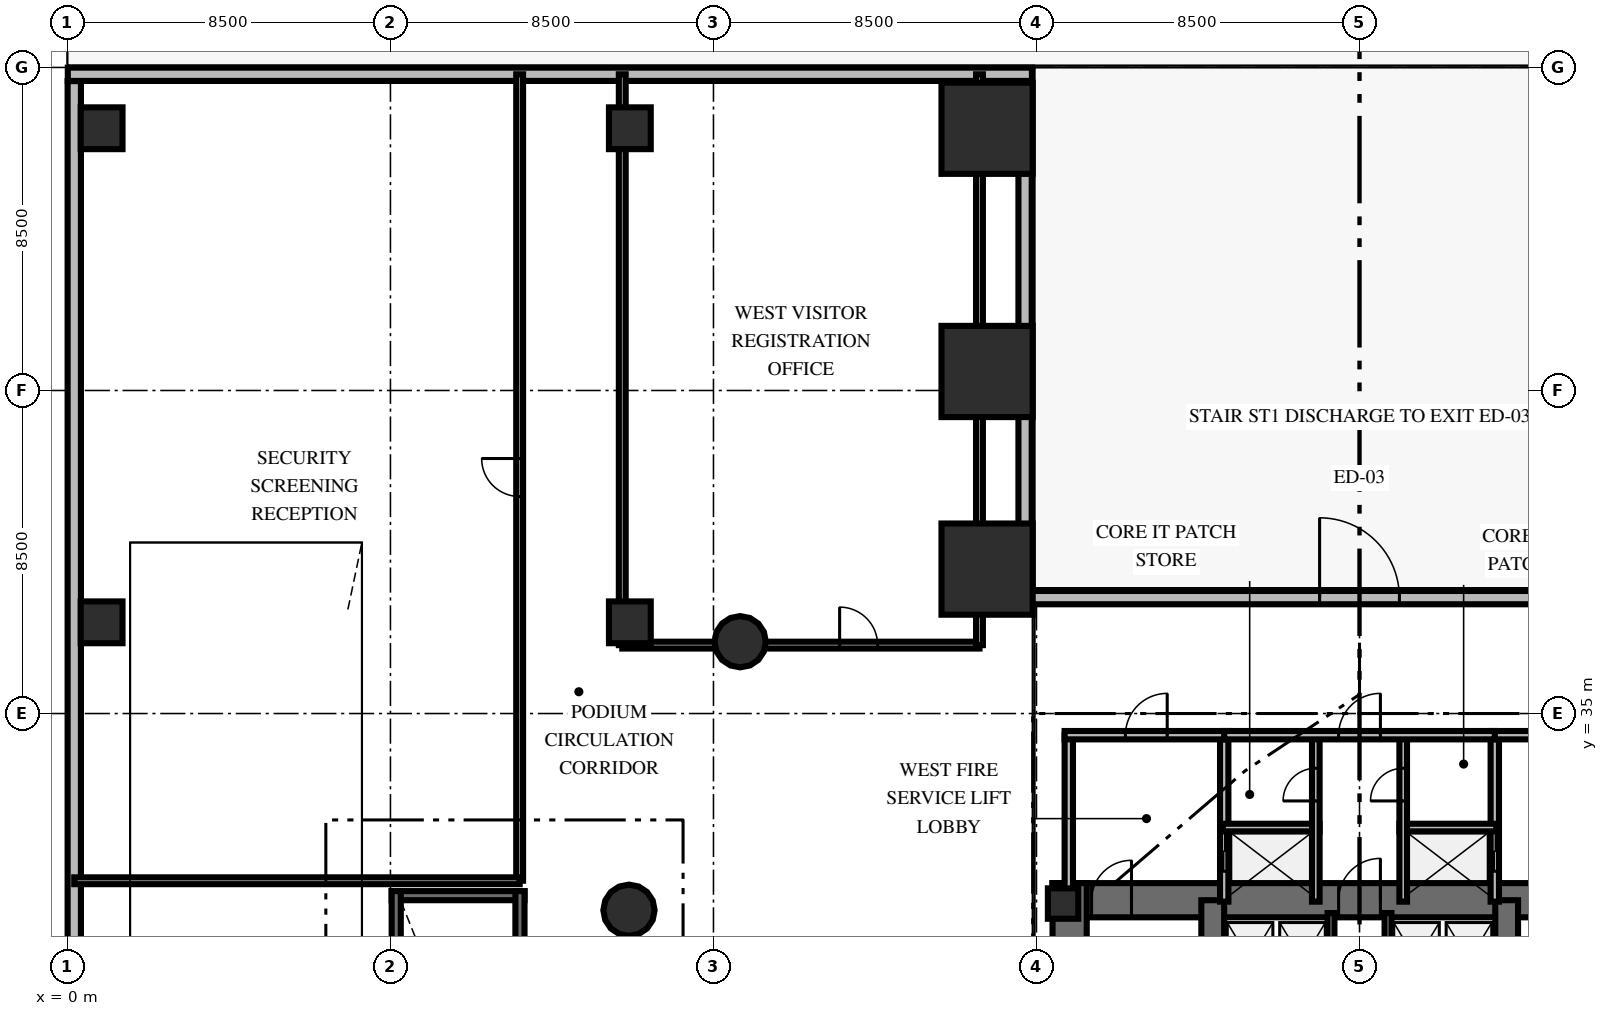
"""IFC4 building model, lengths in metres.
Left out: names, types, materials, properties, quantities, classifications, styles, units other than length and angle.
Written with IfcOpenShell. Run it as: python <this file> out.ifc"""

import sys

from ifc_helpers import new_model, si_unit, direction, frame, frame_2d, origin, origin_2d, place, context, subcontext, project, spatial, rectangle, circle, extrude, element, fill, save


model = new_model("IFC4")
c1 = context("Model", 3, precision=1e-05, world=origin(), true_north=direction((0.0, 1.0)))
c2 = subcontext(c1, "Body", "Model", "MODEL_VIEW")
j1 = project(units=[si_unit("LENGTHUNIT", "METRE"), si_unit("PLANEANGLEUNIT", "RADIAN")], contexts=[c1])
p1 = place(None, origin())
s1 = spatial("IfcSite", under=j1, at=p1, CompositionType="ELEMENT")
p2 = place(p1, origin())
s2 = spatial("IfcBuilding", under=s1, at=p2, CompositionType="ELEMENT")
p3 = place(p2, origin())
s3 = spatial("IfcBuildingStorey", under=s2, at=p3, CompositionType="ELEMENT", Elevation=0.0)
p4 = place(p3, frame((25.922, 30.088, 0.0), z_axis=(0.0, 0.0, 1.0), x_axis=(1.0, 0.0, 0.0)))
e1 = element("IfcWall", 1, at=p4, inside=s3, PredefinedType="SHEAR", context=c2, shape_type="SweptSolid", body=[
    extrude(rectangle(XDim=16.166, YDim=0.9, at=frame_2d((8.083, 0.0))), origin(), (0.0, 0.0, 1.0), 5.4),
])
p5 = place(p4, frame((1.028, 0.0, 0.0)))
e2 = element("IfcOpeningElement", 2, at=p5, cuts=e1, PredefinedType="OPENING", context=c2, shape_type="SweptSolid", body=[
    extrude(rectangle(XDim=1.05, YDim=2.15, at=frame_2d((0.525, 1.075))), frame((0.0, 0.46, 0.0), z_axis=(0.0, -1.0, 0.0), x_axis=(1.0, 0.0, 0.0)), (0.0, 0.0, 1.0), 0.92),
])
p6 = place(p4, frame((14.078, 0.0, 0.0)))
e3 = element("IfcOpeningElement", 3, at=p6, cuts=e1, PredefinedType="OPENING", context=c2, shape_type="SweptSolid", body=[
    extrude(rectangle(XDim=1.05, YDim=2.15, at=frame_2d((0.525, 1.075))), frame((0.0, 0.46, 0.0), z_axis=(0.0, -1.0, 0.0), x_axis=(1.0, 0.0, 0.0)), (0.0, 0.0, 1.0), 0.92),
])
p7 = place(p4, frame((7.528, 0.0, 0.0)))
e4 = element("IfcOpeningElement", 4, at=p7, cuts=e1, PredefinedType="OPENING", context=c2, shape_type="SweptSolid", body=[
    extrude(rectangle(XDim=1.1, YDim=2.15, at=frame_2d((0.55, 1.075))), frame((0.0, 0.46, 0.0), z_axis=(0.0, -1.0, 0.0), x_axis=(1.0, 0.0, 0.0)), (0.0, 0.0, 1.0), 0.92),
])
p8 = place(p3, frame((26.372, 19.662, 0.0), z_axis=(0.0, 0.0, 1.0), x_axis=(0.0, 1.0, 0.0)))
e5 = element("IfcWall", 5, at=p8, inside=s3, PredefinedType="SHEAR", context=c2, shape_type="SweptSolid", body=[
    extrude(rectangle(XDim=10.876, YDim=0.9, at=frame_2d((5.438, 0.0))), origin(), (0.0, 0.0, 1.0), 5.4),
])
for number, where, z_axis, x_axis in (
    (6, (30.138, 20.112, 0.0), (0.0, 0.0, 1.0), (0.0, 1.0, 0.0)),
    (7, (37.872, 20.112, 0.0), (0.0, 0.0, 1.0), (0.0, 1.0, 0.0)),
):
    element("IfcWall", number, at=place(p3, frame(where, z_axis=z_axis, x_axis=x_axis)), inside=s3, PredefinedType="SHEAR", context=c2, shape_type="SweptSolid", body=[
        extrude(rectangle(XDim=9.976, YDim=0.6, at=frame_2d((4.988, 0.0))), origin(), (0.0, 0.0, 1.0), 5.4),
    ])
p9 = place(p3, frame((26.2, 30.0, 0.0), z_axis=(0.0, 0.0, 1.0), x_axis=(1.0, 0.0, 0.0)))
e8 = element("IfcColumn", 8, at=p9, inside=s3, PredefinedType="PILASTER", context=c2, shape_type="SweptSolid", body=[
    extrude(rectangle(XDim=0.8, YDim=0.8, at=origin_2d()), origin(), (0.0, 0.0, 1.0), 5.4),
])
p10 = place(p3, frame((8.532, 30.208, 0.0), z_axis=(0.0, 0.0, 1.0), x_axis=(1.0, 0.0, 0.0)))
e9 = element("IfcWall", 9, at=p10, inside=s3, PredefinedType="SHEAR", context=c2, shape_type="SweptSolid", body=[
    extrude(rectangle(XDim=3.496, YDim=0.24, at=frame_2d((1.748, 0.0))), origin(), (0.0, 0.0, 1.0), 5.4),
])
p11 = place(p3, frame((8.652, 20.772, 0.0), z_axis=(0.0, 0.0, 1.0), x_axis=(0.0, 1.0, 0.0)))
e10 = element("IfcWall", 10, at=p11, inside=s3, PredefinedType="SHEAR", context=c2, shape_type="SweptSolid", body=[
    extrude(rectangle(XDim=9.556, YDim=0.24, at=frame_2d((4.778, 0.0))), origin(), (0.0, 0.0, 1.0), 5.4),
])
p12 = place(p3, frame((11.908, 20.772, 0.0), z_axis=(0.0, 0.0, 1.0), x_axis=(0.0, 1.0, 0.0)))
e11 = element("IfcWall", 11, at=p12, inside=s3, PredefinedType="SHEAR", context=c2, shape_type="SweptSolid", body=[
    extrude(rectangle(XDim=9.556, YDim=0.24, at=frame_2d((4.778, 0.0))), origin(), (0.0, 0.0, 1.0), 5.4),
])
p13 = place(p12, frame((0.55, 0.0, 0.0)))
e12 = element("IfcOpeningElement", 12, at=p13, cuts=e11, PredefinedType="OPENING", context=c2, shape_type="SweptSolid", body=[
    extrude(rectangle(XDim=1.05, YDim=2.15, at=frame_2d((0.525, 1.075))), frame((0.0, 0.13, 0.0), z_axis=(0.0, -1.0, 0.0), x_axis=(1.0, 0.0, 0.0)), (0.0, 0.0, 1.0), 0.26),
])
for number, where, z_axis, x_axis in (
    (13, (24.2, 38.8, 0.0), (0.0, 0.0, 1.0), (1.0, 0.0, 0.0)),
    (14, (24.2, 44.0, 0.0), (0.0, 0.0, 1.0), (1.0, 0.0, 0.0)),
    (15, (24.2, 50.4, 0.0), (0.0, 0.0, 1.0), (1.0, 0.0, 0.0)),
):
    element("IfcColumn", number, at=place(p3, frame(where, z_axis=z_axis, x_axis=x_axis)), inside=s3, PredefinedType="USERDEFINED", context=c2, shape_type="SweptSolid", body=[
        extrude(rectangle(XDim=2.4, YDim=2.4, at=origin_2d()), origin(), (0.0, 0.0, 1.0), 5.4),
    ])
for number, where, z_axis, x_axis in (
    (16, (0.9, 37.4, 0.0), (0.0, 0.0, 1.0), (1.0, 0.0, 0.0)),
    (17, (0.9, 50.4, 0.0), (0.0, 0.0, 1.0), (1.0, 0.0, 0.0)),
    (18, (14.8, 37.4, 0.0), (0.0, 0.0, 1.0), (1.0, 0.0, 0.0)),
    (19, (14.8, 50.4, 0.0), (0.0, 0.0, 1.0), (1.0, 0.0, 0.0)),
):
    element("IfcColumn", number, at=place(p3, frame(where, z_axis=z_axis, x_axis=x_axis)), inside=s3, PredefinedType="COLUMN", context=c2, shape_type="SweptSolid", body=[
        extrude(rectangle(XDim=1.1, YDim=1.1, at=origin_2d()), origin(), (0.0, 0.0, 1.0), 5.4),
    ])
for number, where, z_axis, x_axis in (
    (20, (17.703, 36.889, 0.0), (0.0, 0.0, 1.0), (1.0, 0.0, 0.0)),
    (21, (14.777, 29.824, 0.0), (0.0, 0.0, 1.0), (1.0, 0.0, 0.0)),
):
    element("IfcColumn", number, at=place(p3, frame(where, z_axis=z_axis, x_axis=x_axis)), inside=s3, PredefinedType="COLUMN", context=c2, shape_type="SweptSolid", body=[
        extrude(circle(Radius=0.675, at=origin_2d()), origin(), (0.0, 0.0, 1.0), 5.4),
    ])
p14 = place(p3, frame((0.18, 0.36, 0.0), z_axis=(0.0, 0.0, 1.0), x_axis=(0.0, 1.0, 0.0)))
e22 = element("IfcWall", 22, at=p14, inside=s3, PredefinedType="SOLIDWALL", context=c2, shape_type="SweptSolid", body=[
    extrude(rectangle(XDim=51.28, YDim=0.35, at=frame_2d((25.64, 0.0))), origin(), (0.0, 0.0, 1.0), 4.36),
])
p15 = place(p14, frame((3.5, 0.0, 0.0)))
e23 = element("IfcOpeningElement", 23, at=p15, cuts=e22, PredefinedType="OPENING", context=c2, shape_type="SweptSolid", body=[
    extrude(rectangle(XDim=4.8, YDim=3.1, at=frame_2d((2.4, 1.55))), frame((0.0, 0.185, 0.0), z_axis=(0.0, -1.0, 0.0), x_axis=(1.0, 0.0, 0.0)), (0.0, 0.0, 1.0), 0.37),
])
p16 = place(p3, frame((0.01, 51.82, 0.0), z_axis=(0.0, 0.0, 1.0), x_axis=(1.0, 0.0, 0.0)))
e24 = element("IfcWall", 24, at=p16, inside=s3, PredefinedType="SOLIDWALL", context=c2, shape_type="SweptSolid", body=[
    extrude(rectangle(XDim=25.37, YDim=0.35, at=frame_2d((12.685, 0.0))), origin(), (0.0, 0.0, 1.0), 4.36),
])
p17 = place(p3, frame((25.2, 51.64, 0.0), z_axis=(0.0, 0.0, 1.0), x_axis=(0.0, -1.0, 0.0)))
e25 = element("IfcWall", 25, at=p17, inside=s3, PredefinedType="SOLIDWALL", context=c2, shape_type="SweptSolid", body=[
    extrude(rectangle(XDim=13.59, YDim=0.35, at=frame_2d((6.795, 0.0))), origin(), (0.0, 0.0, 1.0), 4.36),
])
p18 = place(p3, frame((25.38, 38.05, 0.0), z_axis=(0.0, 0.0, 1.0), x_axis=(1.0, 0.0, 0.0)))
e26 = element("IfcWall", 26, at=p18, inside=s3, PredefinedType="SOLIDWALL", context=c2, shape_type="SweptSolid", body=[
    extrude(rectangle(XDim=17.24, YDim=0.35, at=frame_2d((8.62, 0.0))), origin(), (0.0, 0.0, 1.0), 4.36),
])
p19 = place(p18, frame((7.57, 0.0, 0.0)))
e27 = element("IfcOpeningElement", 27, at=p19, cuts=e26, PredefinedType="OPENING", context=c2, shape_type="SweptSolid", body=[
    extrude(rectangle(XDim=2.1, YDim=2.35, at=frame_2d((1.05, 1.175))), frame((0.0, 0.185, 0.0), z_axis=(0.0, -1.0, 0.0), x_axis=(1.0, 0.0, 0.0)), (0.0, 0.0, 1.0), 0.37),
])
p20 = place(p3, frame((26.35, 30.05, 0.0), z_axis=(0.0, 0.0, 1.0), x_axis=(0.0, 1.0, 0.0)))
e28 = element("IfcWall", 28, at=p20, inside=s3, PredefinedType="SOLIDWALL", context=c2, shape_type="SweptSolid", body=[
    extrude(rectangle(XDim=4.38, YDim=0.22, at=frame_2d((2.19, 0.0))), origin(), (0.0, 0.0, 1.0), 4.16),
])
p21 = place(p3, frame((30.44, 30.05, 0.0), z_axis=(0.0, 0.0, 1.0), x_axis=(0.0, 1.0, 0.0)))
e29 = element("IfcWall", 29, at=p21, inside=s3, PredefinedType="SOLIDWALL", context=c2, shape_type="SweptSolid", body=[
    extrude(rectangle(XDim=4.38, YDim=0.22, at=frame_2d((2.19, 0.0))), origin(), (0.0, 0.0, 1.0), 4.16),
])
p22 = place(p21, frame((0.8, 0.0, 0.0)))
e30 = element("IfcOpeningElement", 30, at=p22, cuts=e29, PredefinedType="OPENING", context=c2, shape_type="SweptSolid", body=[
    extrude(rectangle(XDim=1.05, YDim=2.1, at=frame_2d((0.525, 1.05))), frame((0.0, 0.12, 0.0), z_axis=(0.0, -1.0, 0.0), x_axis=(1.0, 0.0, 0.0)), (0.0, 0.0, 1.0), 0.24),
])
p23 = place(p3, frame((26.24, 34.43, 0.0), z_axis=(0.0, 0.0, 1.0), x_axis=(1.0, 0.0, 0.0)))
e31 = element("IfcWall", 31, at=p23, inside=s3, PredefinedType="SOLIDWALL", context=c2, shape_type="SweptSolid", body=[
    extrude(rectangle(XDim=4.31, YDim=0.22, at=frame_2d((2.155, 0.0))), origin(), (0.0, 0.0, 1.0), 4.16),
])
p24 = place(p23, frame((1.6, 0.0, 0.0)))
e32 = element("IfcOpeningElement", 32, at=p24, cuts=e31, PredefinedType="OPENING", context=c2, shape_type="SweptSolid", body=[
    extrude(rectangle(XDim=1.1, YDim=2.15, at=frame_2d((0.55, 1.075))), frame((0.0, 0.12, 0.0), z_axis=(0.0, -1.0, 0.0), x_axis=(1.0, 0.0, 0.0)), (0.0, 0.0, 1.0), 0.24),
])
p25 = place(p3, frame((30.4, 32.0, 0.0), z_axis=(0.0, 0.0, 1.0), x_axis=(1.0, 0.0, 0.0)))
e33 = element("IfcWall", 33, at=p25, inside=s3, PredefinedType="SOLIDWALL", context=c2, shape_type="SweptSolid", body=[
    extrude(rectangle(XDim=2.55, YDim=0.2, at=frame_2d((1.275, 0.0))), origin(), (0.0, 0.0, 1.0), 4.16),
])
p26 = place(p3, frame((32.85, 30.05, 0.0), z_axis=(0.0, 0.0, 1.0), x_axis=(0.0, 1.0, 0.0)))
e34 = element("IfcWall", 34, at=p26, inside=s3, PredefinedType="SOLIDWALL", context=c2, shape_type="SweptSolid", body=[
    extrude(rectangle(XDim=4.38, YDim=0.2, at=frame_2d((2.19, 0.0))), origin(), (0.0, 0.0, 1.0), 4.16),
])
p27 = place(p26, frame((2.65, 0.0, 0.0)))
e35 = element("IfcOpeningElement", 35, at=p27, cuts=e34, PredefinedType="OPENING", context=c2, shape_type="SweptSolid", body=[
    extrude(rectangle(XDim=0.86, YDim=2.05, at=frame_2d((0.43, 1.025))), frame((0.0, 0.11, 0.0), z_axis=(0.0, -1.0, 0.0), x_axis=(1.0, 0.0, 0.0)), (0.0, 0.0, 1.0), 0.22),
])
p28 = place(p3, frame((37.56, 30.05, 0.0), z_axis=(0.0, 0.0, 1.0), x_axis=(0.0, 1.0, 0.0)))
e36 = element("IfcWall", 36, at=p28, inside=s3, PredefinedType="SOLIDWALL", context=c2, shape_type="SweptSolid", body=[
    extrude(rectangle(XDim=4.38, YDim=0.22, at=frame_2d((2.19, 0.0))), origin(), (0.0, 0.0, 1.0), 4.16),
])
p29 = place(p28, frame((0.8, 0.0, 0.0)))
e37 = element("IfcOpeningElement", 37, at=p29, cuts=e36, PredefinedType="OPENING", context=c2, shape_type="SweptSolid", body=[
    extrude(rectangle(XDim=1.05, YDim=2.1, at=frame_2d((0.525, 1.05))), frame((0.0, 0.12, 0.0), z_axis=(0.0, -1.0, 0.0), x_axis=(1.0, 0.0, 0.0)), (0.0, 0.0, 1.0), 0.24),
])
p30 = place(p3, frame((37.45, 34.43, 0.0), z_axis=(0.0, 0.0, 1.0), x_axis=(1.0, 0.0, 0.0)))
e38 = element("IfcWall", 38, at=p30, inside=s3, PredefinedType="SOLIDWALL", context=c2, shape_type="SweptSolid", body=[
    extrude(rectangle(XDim=4.31, YDim=0.22, at=frame_2d((2.155, 0.0))), origin(), (0.0, 0.0, 1.0), 4.16),
])
p31 = place(p30, frame((1.6, 0.0, 0.0)))
e39 = element("IfcOpeningElement", 39, at=p31, cuts=e38, PredefinedType="OPENING", context=c2, shape_type="SweptSolid", body=[
    extrude(rectangle(XDim=1.1, YDim=2.15, at=frame_2d((0.55, 1.075))), frame((0.0, 0.12, 0.0), z_axis=(0.0, -1.0, 0.0), x_axis=(1.0, 0.0, 0.0)), (0.0, 0.0, 1.0), 0.24),
])
p32 = place(p3, frame((35.05, 32.0, 0.0), z_axis=(0.0, 0.0, 1.0), x_axis=(1.0, 0.0, 0.0)))
e40 = element("IfcWall", 40, at=p32, inside=s3, PredefinedType="SOLIDWALL", context=c2, shape_type="SweptSolid", body=[
    extrude(rectangle(XDim=2.55, YDim=0.2, at=frame_2d((1.275, 0.0))), origin(), (0.0, 0.0, 1.0), 4.16),
])
p33 = place(p3, frame((35.15, 30.05, 0.0), z_axis=(0.0, 0.0, 1.0), x_axis=(0.0, 1.0, 0.0)))
e41 = element("IfcWall", 41, at=p33, inside=s3, PredefinedType="SOLIDWALL", context=c2, shape_type="SweptSolid", body=[
    extrude(rectangle(XDim=4.38, YDim=0.2, at=frame_2d((2.19, 0.0))), origin(), (0.0, 0.0, 1.0), 4.16),
])
p34 = place(p33, frame((2.65, 0.0, 0.0)))
e42 = element("IfcOpeningElement", 42, at=p34, cuts=e41, PredefinedType="OPENING", context=c2, shape_type="SweptSolid", body=[
    extrude(rectangle(XDim=0.86, YDim=2.05, at=frame_2d((0.43, 1.025))), frame((0.0, 0.11, 0.0), z_axis=(0.0, -1.0, 0.0), x_axis=(1.0, 0.0, 0.0)), (0.0, 0.0, 1.0), 0.22),
])
p35 = place(p3, frame((30.44, 34.43, 0.0), z_axis=(0.0, 0.0, 1.0), x_axis=(1.0, 0.0, 0.0)))
e43 = element("IfcWall", 43, at=p35, inside=s3, PredefinedType="SOLIDWALL", context=c2, shape_type="SweptSolid", body=[
    extrude(rectangle(XDim=7.12, YDim=0.22, at=frame_2d((3.56, 0.0))), origin(), (0.0, 0.0, 1.0), 4.16),
])
p36 = place(p35, frame((3.01, 0.0, 0.0)))
e44 = element("IfcOpeningElement", 44, at=p36, cuts=e43, PredefinedType="OPENING", context=c2, shape_type="SweptSolid", body=[
    extrude(rectangle(XDim=1.1, YDim=2.15, at=frame_2d((0.55, 1.075))), frame((0.0, 0.12, 0.0), z_axis=(0.0, -1.0, 0.0), x_axis=(1.0, 0.0, 0.0)), (0.0, 0.0, 1.0), 0.24),
])
for number, where, z_axis, x_axis in (
    (45, (33.25, 27.28, 0.0), (0.0, 0.0, 1.0), (0.0, 1.0, 0.0)),
    (46, (34.75, 27.28, 0.0), (0.0, 0.0, 1.0), (0.0, 1.0, 0.0)),
):
    element("IfcWall", number, at=place(p3, frame(where, z_axis=z_axis, x_axis=x_axis)), inside=s3, PredefinedType="SOLIDWALL", context=c2, shape_type="SweptSolid", body=[
        extrude(rectangle(XDim=2.47, YDim=0.18, at=frame_2d((1.235, 0.0))), origin(), (0.0, 0.0, 1.0), 4.16),
    ])
p37 = place(p3, frame((11.9, 30.6, 0.0), z_axis=(0.0, 0.0, 1.0), x_axis=(0.0, 1.0, 0.0)))
e47 = element("IfcWall", 47, at=p37, inside=s3, PredefinedType="PARTITIONING", context=c2, shape_type="SweptSolid", body=[
    extrude(rectangle(XDim=21.22, YDim=0.18, at=frame_2d((10.61, 0.0))), origin(), (0.0, 0.0, 1.0), 4.16),
])
p38 = place(p37, frame((10.11, 0.0, 0.0)))
e48 = element("IfcOpeningElement", 48, at=p38, cuts=e47, PredefinedType="OPENING", context=c2, shape_type="SweptSolid", body=[
    extrude(rectangle(XDim=1.0, YDim=2.15, at=frame_2d((0.5, 1.075))), frame((0.0, 0.1, 0.0), z_axis=(0.0, -1.0, 0.0), x_axis=(1.0, 0.0, 0.0)), (0.0, 0.0, 1.0), 0.2),
])
p39 = place(p3, frame((0.18, 30.6, 0.0), z_axis=(0.0, 0.0, 1.0), x_axis=(1.0, 0.0, 0.0)))
e49 = element("IfcWall", 49, at=p39, inside=s3, PredefinedType="PARTITIONING", context=c2, shape_type="SweptSolid", body=[
    extrude(rectangle(XDim=11.72, YDim=0.18, at=frame_2d((5.86, 0.0))), origin(), (0.0, 0.0, 1.0), 4.16),
])
p40 = place(p3, frame((14.6, 36.8, 0.0), z_axis=(0.0, 0.0, 1.0), x_axis=(1.0, 0.0, 0.0)))
e50 = element("IfcWall", 50, at=p40, inside=s3, PredefinedType="PARTITIONING", context=c2, shape_type="SweptSolid", body=[
    extrude(rectangle(XDim=9.4, YDim=0.18, at=frame_2d((4.7, 0.0))), origin(), (0.0, 0.0, 1.0), 4.16),
])
p41 = place(p40, frame((5.72, 0.0, 0.0)))
e51 = element("IfcOpeningElement", 51, at=p41, cuts=e50, PredefinedType="OPENING", context=c2, shape_type="SweptSolid", body=[
    extrude(rectangle(XDim=1.0, YDim=2.15, at=frame_2d((0.5, 1.075))), frame((0.0, 0.1, 0.0), z_axis=(0.0, -1.0, 0.0), x_axis=(1.0, 0.0, 0.0)), (0.0, 0.0, 1.0), 0.2),
])
for number, where, z_axis, x_axis in (
    (52, (24.0, 36.8, 0.0), (0.0, 0.0, 1.0), (0.0, 1.0, 0.0)),
    (53, (14.6, 51.82, 0.0), (0.0, 0.0, 1.0), (0.0, -1.0, 0.0)),
):
    element("IfcWall", number, at=place(p3, frame(where, z_axis=z_axis, x_axis=x_axis)), inside=s3, PredefinedType="PARTITIONING", context=c2, shape_type="SweptSolid", body=[
        extrude(rectangle(XDim=15.02, YDim=0.18, at=frame_2d((7.51, 0.0))), origin(), (0.0, 0.0, 1.0), 4.16),
    ])
p42 = place(p19, origin())
e54 = element("IfcDoor", 54, at=p42, inside=s3, OperationType="DOUBLE_DOOR_SINGLE_SWING", PredefinedType="DOOR", context=c2, shape_type="SweptSolid", body=[
    extrude(rectangle(XDim=2.1, YDim=2.35, at=frame_2d((1.05, 1.175))), frame((0.0, 0.025, 0.0), z_axis=(0.0, -1.0, 0.0), x_axis=(1.0, 0.0, 0.0)), (0.0, 0.0, 1.0), 0.05),
])
fill(e27, e54)
p43 = place(p5, origin())
e55 = element("IfcDoor", 55, at=p43, inside=s3, OperationType="SINGLE_SWING_RIGHT", PredefinedType="DOOR", context=c2, shape_type="SweptSolid", body=[
    extrude(rectangle(XDim=1.05, YDim=2.15, at=frame_2d((0.525, 1.075))), frame((0.0, 0.025, 0.0), z_axis=(0.0, -1.0, 0.0), x_axis=(1.0, 0.0, 0.0)), (0.0, 0.0, 1.0), 0.05),
])
fill(e2, e55)
p44 = place(p7, origin())
e56 = element("IfcDoor", 56, at=p44, inside=s3, OperationType="SINGLE_SWING_RIGHT", PredefinedType="DOOR", context=c2, shape_type="SweptSolid", body=[
    extrude(rectangle(XDim=1.1, YDim=2.15, at=frame_2d((0.55, 1.075))), frame((0.0, 0.025, 0.0), z_axis=(0.0, -1.0, 0.0), x_axis=(1.0, 0.0, 0.0)), (0.0, 0.0, 1.0), 0.05),
])
fill(e4, e56)
p45 = place(p24, origin())
e57 = element("IfcDoor", 57, at=p45, inside=s3, OperationType="SINGLE_SWING_RIGHT", PredefinedType="DOOR", context=c2, shape_type="SweptSolid", body=[
    extrude(rectangle(XDim=1.1, YDim=2.15, at=frame_2d((0.55, 1.075))), frame((0.0, 0.025, 0.0), z_axis=(0.0, -1.0, 0.0), x_axis=(1.0, 0.0, 0.0)), (0.0, 0.0, 1.0), 0.05),
])
fill(e32, e57)
p46 = place(p22, origin())
e58 = element("IfcDoor", 58, at=p46, inside=s3, OperationType="DOUBLE_DOOR_SLIDING", PredefinedType="USERDEFINED", context=c2, shape_type="SweptSolid", body=[
    extrude(rectangle(XDim=1.05, YDim=2.1, at=frame_2d((0.525, 1.05))), frame((0.0, 0.025, 0.0), z_axis=(0.0, -1.0, 0.0), x_axis=(1.0, 0.0, 0.0)), (0.0, 0.0, 1.0), 0.05),
])
fill(e30, e58)
p47 = place(p27, origin())
e59 = element("IfcDoor", 59, at=p47, inside=s3, OperationType="SINGLE_SWING_LEFT", PredefinedType="TRAPDOOR", context=c2, shape_type="SweptSolid", body=[
    extrude(rectangle(XDim=0.86, YDim=2.05, at=frame_2d((0.43, 1.025))), frame((0.0, 0.025, 0.0), z_axis=(0.0, -1.0, 0.0), x_axis=(1.0, 0.0, 0.0)), (0.0, 0.0, 1.0), 0.05),
])
fill(e35, e59)
p48 = place(p29, origin())
e60 = element("IfcDoor", 60, at=p48, inside=s3, OperationType="DOUBLE_DOOR_SLIDING", PredefinedType="USERDEFINED", context=c2, shape_type="SweptSolid", body=[
    extrude(rectangle(XDim=1.05, YDim=2.1, at=frame_2d((0.525, 1.05))), frame((0.0, 0.025, 0.0), z_axis=(0.0, -1.0, 0.0), x_axis=(1.0, 0.0, 0.0)), (0.0, 0.0, 1.0), 0.05),
])
fill(e37, e60)
p49 = place(p34, origin())
e61 = element("IfcDoor", 61, at=p49, inside=s3, OperationType="SINGLE_SWING_LEFT", PredefinedType="TRAPDOOR", context=c2, shape_type="SweptSolid", body=[
    extrude(rectangle(XDim=0.86, YDim=2.05, at=frame_2d((0.43, 1.025))), frame((0.0, 0.025, 0.0), z_axis=(0.0, -1.0, 0.0), x_axis=(1.0, 0.0, 0.0)), (0.0, 0.0, 1.0), 0.05),
])
fill(e42, e61)
p50 = place(p36, origin())
e62 = element("IfcDoor", 62, at=p50, inside=s3, OperationType="SINGLE_SWING_RIGHT", PredefinedType="DOOR", context=c2, shape_type="SweptSolid", body=[
    extrude(rectangle(XDim=1.1, YDim=2.15, at=frame_2d((0.55, 1.075))), frame((0.0, 0.025, 0.0), z_axis=(0.0, -1.0, 0.0), x_axis=(1.0, 0.0, 0.0)), (0.0, 0.0, 1.0), 0.05),
])
fill(e44, e62)
p51 = place(p38, origin())
e63 = element("IfcDoor", 63, at=p51, inside=s3, OperationType="SINGLE_SWING_RIGHT", PredefinedType="DOOR", context=c2, shape_type="SweptSolid", body=[
    extrude(rectangle(XDim=1.0, YDim=2.15, at=frame_2d((0.5, 1.075))), frame((0.0, 0.025, 0.0), z_axis=(0.0, -1.0, 0.0), x_axis=(1.0, 0.0, 0.0)), (0.0, 0.0, 1.0), 0.05),
])
fill(e48, e63)
p52 = place(p41, origin())
e64 = element("IfcDoor", 64, at=p52, inside=s3, OperationType="SINGLE_SWING_LEFT", PredefinedType="DOOR", context=c2, shape_type="SweptSolid", body=[
    extrude(rectangle(XDim=1.0, YDim=2.15, at=frame_2d((0.5, 1.075))), frame((0.0, 0.025, 0.0), z_axis=(0.0, -1.0, 0.0), x_axis=(1.0, 0.0, 0.0)), (0.0, 0.0, 1.0), 0.05),
])
fill(e51, e64)
save(model, sys.argv[1])
